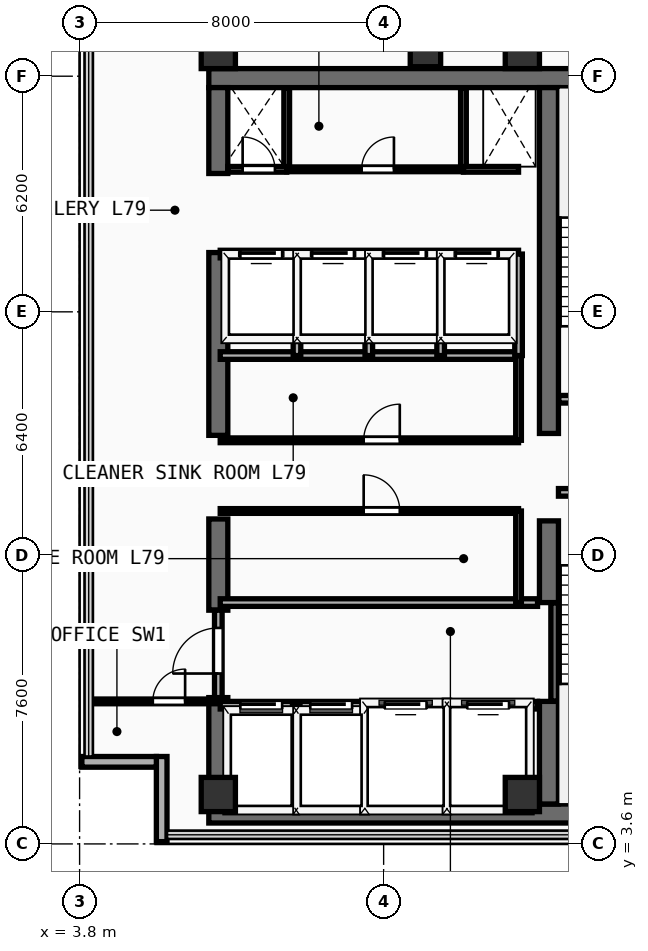
"""IFC4 building model, lengths in metres.
Left out: names, types, materials, properties, quantities, classifications, styles, units other than length and angle.
Written with IfcOpenShell. Run it as: python <this file> out.ifc"""

import sys

from ifc_helpers import new_model, si_unit, direction, frame, frame_2d, origin, origin_2d, place, context, subcontext, project, spatial, rectangle, extrude, element, fill, save


model = new_model("IFC4")
c1 = context("Model", 3, precision=1e-05, world=origin(), true_north=direction((0.0, 1.0)))
c2 = subcontext(c1, "Body", "Model", "MODEL_VIEW")
j1 = project(units=[si_unit("LENGTHUNIT", "METRE"), si_unit("PLANEANGLEUNIT", "RADIAN")], contexts=[c1])
p1 = place(None, origin())
s1 = spatial("IfcSite", under=j1, at=p1, CompositionType="ELEMENT")
p2 = place(p1, origin())
s2 = spatial("IfcBuilding", under=s1, at=p2, CompositionType="ELEMENT")
p3 = place(p2, frame((0.0, 0.0, 308.4)))
s3 = spatial("IfcBuildingStorey", under=s2, at=p3, CompositionType="ELEMENT", Elevation=308.4)
for number, where, z_axis, x_axis in (
    (1, (7.2, 4.4, 0.0), (0.0, 0.0, 1.0), (1.0, 0.0, 0.0)),
    (2, (7.2, 23.75, 0.0), (0.0, 0.0, 1.0), (1.0, 0.0, 0.0)),
):
    element("IfcWall", number, at=place(p3, frame(where, z_axis=z_axis, x_axis=x_axis)), inside=s3, PredefinedType="SHEAR", context=c2, shape_type="SweptSolid", body=[
        extrude(rectangle(XDim=13.85, YDim=0.5, at=frame_2d((6.925, 0.0))), origin(), (0.0, 0.0, 1.0), 3.56),
    ])
p4 = place(p3, frame((7.45, 4.65, 0.0), z_axis=(0.0, 0.0, 1.0), x_axis=(0.0, 1.0, 0.0)))
e3 = element("IfcWall", 3, at=p4, inside=s3, PredefinedType="SHEAR", context=c2, shape_type="SweptSolid", body=[
    extrude(rectangle(XDim=2.8, YDim=0.5, at=frame_2d((1.4, 0.0))), origin(), (0.0, 0.0, 1.0), 3.56),
])
p5 = place(p3, frame((7.45, 9.75, 0.0), z_axis=(0.0, 0.0, 1.0), x_axis=(0.0, 1.0, 0.0)))
e4 = element("IfcWall", 4, at=p5, inside=s3, PredefinedType="SHEAR", context=c2, shape_type="SweptSolid", body=[
    extrude(rectangle(XDim=2.4, YDim=0.5, at=frame_2d((1.2, 0.0))), origin(), (0.0, 0.0, 1.0), 3.56),
])
p6 = place(p3, frame((7.45, 14.35, 0.0), z_axis=(0.0, 0.0, 1.0), x_axis=(0.0, 1.0, 0.0)))
e5 = element("IfcWall", 5, at=p6, inside=s3, PredefinedType="SHEAR", context=c2, shape_type="SweptSolid", body=[
    extrude(rectangle(XDim=4.81, YDim=0.5, at=frame_2d((2.405, 0.0))), origin(), (0.0, 0.0, 1.0), 3.56),
])
p7 = place(p3, frame((7.45, 21.24, 0.0), z_axis=(0.0, 0.0, 1.0), x_axis=(0.0, 1.0, 0.0)))
e6 = element("IfcWall", 6, at=p7, inside=s3, PredefinedType="SHEAR", context=c2, shape_type="SweptSolid", body=[
    extrude(rectangle(XDim=2.26, YDim=0.5, at=frame_2d((1.13, 0.0))), origin(), (0.0, 0.0, 1.0), 3.56),
])
p8 = place(p3, frame((16.15, 4.65, 0.0), z_axis=(0.0, 0.0, 1.0), x_axis=(0.0, 1.0, 0.0)))
e7 = element("IfcWall", 7, at=p8, inside=s3, PredefinedType="SHEAR", context=c2, shape_type="SweptSolid", body=[
    extrude(rectangle(XDim=2.7, YDim=0.5, at=frame_2d((1.35, 0.0))), origin(), (0.0, 0.0, 1.0), 3.56),
])
p9 = place(p3, frame((16.15, 9.95, 0.0), z_axis=(0.0, 0.0, 1.0), x_axis=(0.0, 1.0, 0.0)))
e8 = element("IfcWall", 8, at=p9, inside=s3, PredefinedType="SHEAR", context=c2, shape_type="SweptSolid", body=[
    extrude(rectangle(XDim=2.15, YDim=0.5, at=frame_2d((1.075, 0.0))), origin(), (0.0, 0.0, 1.0), 3.56),
])
p10 = place(p3, frame((16.15, 14.4, 0.0), z_axis=(0.0, 0.0, 1.0), x_axis=(0.0, 1.0, 0.0)))
e9 = element("IfcWall", 9, at=p10, inside=s3, PredefinedType="SHEAR", context=c2, shape_type="SweptSolid", body=[
    extrude(rectangle(XDim=9.1, YDim=0.5, at=frame_2d((4.55, 0.0))), origin(), (0.0, 0.0, 1.0), 3.56),
])
for number, where, z_axis, x_axis in (
    (10, (7.45, 4.9, 0.0), (0.0, 0.0, 1.0), (1.0, 0.0, 0.0)),
    (11, (15.45, 4.9, 0.0), (0.0, 0.0, 1.0), (1.0, 0.0, 0.0)),
    (12, (7.45, 24.45, 0.0), (0.0, 0.0, 1.0), (1.0, 0.0, 0.0)),
    (13, (15.45, 24.45, 0.0), (0.0, 0.0, 1.0), (1.0, 0.0, 0.0)),
):
    element("IfcColumn", number, at=place(p3, frame(where, z_axis=z_axis, x_axis=x_axis)), inside=s3, PredefinedType="COLUMN", context=c2, shape_type="SweptSolid", body=[
        extrude(rectangle(XDim=0.9, YDim=0.9, at=origin_2d()), origin(), (0.0, 0.0, 1.0), 3.56),
    ])
p11 = place(p3, frame((12.9, 24.45, 0.0), z_axis=(0.0, 0.0, 1.0), x_axis=(1.0, 0.0, 0.0)))
e14 = element("IfcColumn", 14, at=p11, inside=s3, PredefinedType="COLUMN", context=c2, shape_type="SweptSolid", body=[
    extrude(rectangle(XDim=0.8, YDim=0.8, at=origin_2d()), origin(), (0.0, 0.0, 1.0), 3.56),
])
p12 = place(p3, frame((5.96, 3.66, 0.0), z_axis=(0.0, 0.0, 1.0), x_axis=(0.0, 1.0, 0.0)))
e15 = element("IfcWall", 15, at=p12, inside=s3, PredefinedType="SOLIDWALL", context=c2, shape_type="SweptSolid", body=[
    extrude(rectangle(XDim=2.24, YDim=0.28, at=frame_2d((1.12, 0.0))), origin(), (0.0, 0.0, 1.0), 3.56),
])
p13 = place(p3, frame((3.86, 5.76, 0.0), z_axis=(0.0, 0.0, 1.0), x_axis=(1.0, 0.0, 0.0)))
e16 = element("IfcWall", 16, at=p13, inside=s3, PredefinedType="SOLIDWALL", context=c2, shape_type="SweptSolid", body=[
    extrude(rectangle(XDim=1.96, YDim=0.28, at=frame_2d((0.98, 0.0))), origin(), (0.0, 0.0, 1.0), 3.56),
])
p14 = place(p3, frame((16.3, 7.36, 0.0), z_axis=(0.0, 0.0, 1.0), x_axis=(0.0, 1.0, 0.0)))
e17 = element("IfcWall", 17, at=p14, inside=s3, PredefinedType="SHEAR", context=c2, shape_type="SweptSolid", body=[
    extrude(rectangle(XDim=2.58, YDim=0.2, at=frame_2d((1.29, 0.0))), origin(), (0.0, 0.0, 1.0), 3.56),
])
p15 = place(p3, frame((16.4, 12.85, 0.0), z_axis=(0.0, 0.0, 1.0), x_axis=(1.0, 0.0, 0.0)))
e18 = element("IfcWall", 18, at=p15, inside=s3, PredefinedType="PARTITIONING", context=c2, shape_type="SweptSolid", body=[
    extrude(rectangle(XDim=3.96, YDim=0.2, at=frame_2d((1.98, 0.0))), origin(), (0.0, 0.0, 1.0), 3.56),
])
p16 = place(p15, frame((1.304, 0.0, 0.0)))
e19 = element("IfcOpeningElement", 19, at=p16, cuts=e18, PredefinedType="OPENING", context=c2, shape_type="SweptSolid", body=[
    extrude(rectangle(XDim=1.1, YDim=2.2, at=frame_2d((0.55, 1.1))), frame((0.0, 0.11, 0.0), z_axis=(0.0, -1.0, 0.0), x_axis=(1.0, 0.0, 0.0)), (0.0, 0.0, 1.0), 0.22),
])
p17 = place(p3, frame((16.41, 15.3, 0.0), z_axis=(0.0, 0.0, 1.0), x_axis=(1.0, 0.0, 0.0)))
e20 = element("IfcWall", 20, at=p17, inside=s3, PredefinedType="PARTITIONING", context=c2, shape_type="SweptSolid", body=[
    extrude(rectangle(XDim=3.95, YDim=0.2, at=frame_2d((1.975, 0.0))), origin(), (0.0, 0.0, 1.0), 3.56),
])
p18 = place(p17, frame((1.294, 0.0, 0.0)))
e21 = element("IfcOpeningElement", 21, at=p18, cuts=e20, PredefinedType="OPENING", context=c2, shape_type="SweptSolid", body=[
    extrude(rectangle(XDim=1.1, YDim=2.2, at=frame_2d((0.55, 1.1))), frame((0.0, 0.11, 0.0), z_axis=(0.0, -1.0, 0.0), x_axis=(1.0, 0.0, 0.0)), (0.0, 0.0, 1.0), 0.22),
])
p19 = place(p3, frame((7.5, 7.25, 0.0), z_axis=(0.0, 0.0, 1.0), x_axis=(1.0, 0.0, 0.0)))
e22 = element("IfcWall", 22, at=p19, inside=s3, PredefinedType="PARTITIONING", context=c2, shape_type="SweptSolid", body=[
    extrude(rectangle(XDim=8.35, YDim=0.2, at=frame_2d((4.175, 0.0))), origin(), (0.0, 0.0, 1.0), 3.56),
])
p20 = place(p19, frame((0.53, 0.0, 0.0)))
e23 = element("IfcOpeningElement", 23, at=p20, cuts=e22, PredefinedType="OPENING", context=c2, shape_type="SweptSolid", body=[
    extrude(rectangle(XDim=1.1, YDim=2.2, at=frame_2d((0.55, 1.1))), frame((0.0, 0.11, 0.0), z_axis=(0.0, -1.0, 0.0), x_axis=(1.0, 0.0, 0.0)), (0.0, 0.0, 1.0), 0.22),
])
p21 = place(p19, frame((2.37, 0.0, 0.0)))
e24 = element("IfcOpeningElement", 24, at=p21, cuts=e22, PredefinedType="OPENING", context=c2, shape_type="SweptSolid", body=[
    extrude(rectangle(XDim=1.1, YDim=2.2, at=frame_2d((0.55, 1.1))), frame((0.0, 0.11, 0.0), z_axis=(0.0, -1.0, 0.0), x_axis=(1.0, 0.0, 0.0)), (0.0, 0.0, 1.0), 0.22),
])
p22 = place(p19, frame((4.33, 0.0, 0.0)))
e25 = element("IfcOpeningElement", 25, at=p22, cuts=e22, PredefinedType="OPENING", context=c2, shape_type="SweptSolid", body=[
    extrude(rectangle(XDim=1.1, YDim=2.2, at=frame_2d((0.55, 1.1))), frame((0.0, 0.11, 0.0), z_axis=(0.0, -1.0, 0.0), x_axis=(1.0, 0.0, 0.0)), (0.0, 0.0, 1.0), 0.22),
])
p23 = place(p19, frame((6.5, 0.0, 0.0)))
e26 = element("IfcOpeningElement", 26, at=p23, cuts=e22, PredefinedType="OPENING", context=c2, shape_type="SweptSolid", body=[
    extrude(rectangle(XDim=1.1, YDim=2.2, at=frame_2d((0.55, 1.1))), frame((0.0, 0.11, 0.0), z_axis=(0.0, -1.0, 0.0), x_axis=(1.0, 0.0, 0.0)), (0.0, 0.0, 1.0), 0.22),
])
p24 = place(p3, frame((7.5, 9.95, 0.0), z_axis=(0.0, 0.0, 1.0), x_axis=(1.0, 0.0, 0.0)))
e27 = element("IfcWall", 27, at=p24, inside=s3, PredefinedType="PARTITIONING", context=c2, shape_type="SweptSolid", body=[
    extrude(rectangle(XDim=8.35, YDim=0.2, at=frame_2d((4.175, 0.0))), origin(), (0.0, 0.0, 1.0), 3.56),
])
for number, where, z_axis, x_axis in (
    (28, (9.5, 4.45, 0.0), (0.0, 0.0, 1.0), (0.0, 1.0, 0.0)),
    (29, (11.36, 4.45, 0.0), (0.0, 0.0, 1.0), (0.0, 1.0, 0.0)),
    (30, (13.46, 4.45, 0.0), (0.0, 0.0, 1.0), (0.0, 1.0, 0.0)),
):
    element("IfcWall", number, at=place(p3, frame(where, z_axis=z_axis, x_axis=x_axis)), inside=s3, PredefinedType="PARTITIONING", context=c2, shape_type="SweptSolid", body=[
        extrude(rectangle(XDim=2.8, YDim=0.2, at=frame_2d((1.4, 0.0))), origin(), (0.0, 0.0, 1.0), 3.56),
    ])
p25 = place(p3, frame((7.45, 7.45, 0.0), z_axis=(0.0, 0.0, 1.0), x_axis=(0.0, 1.0, 0.0)))
e31 = element("IfcWall", 31, at=p25, inside=s3, PredefinedType="PARTITIONING", context=c2, shape_type="SweptSolid", body=[
    extrude(rectangle(XDim=2.3, YDim=0.2, at=frame_2d((1.15, 0.0))), origin(), (0.0, 0.0, 1.0), 2.54),
])
p26 = place(p25, frame((0.633, 0.0, 0.0)))
e32 = element("IfcOpeningElement", 32, at=p26, cuts=e31, PredefinedType="OPENING", context=c2, shape_type="SweptSolid", body=[
    extrude(rectangle(XDim=1.2, YDim=2.25, at=frame_2d((0.6, 1.125))), frame((0.0, 0.11, 0.0), z_axis=(0.0, -1.0, 0.0), x_axis=(1.0, 0.0, 0.0)), (0.0, 0.0, 1.0), 0.22),
])
p27 = place(p3, frame((7.5, 16.45, 0.0), z_axis=(0.0, 0.0, 1.0), x_axis=(1.0, 0.0, 0.0)))
e33 = element("IfcWall", 33, at=p27, inside=s3, PredefinedType="PARTITIONING", context=c2, shape_type="SweptSolid", body=[
    extrude(rectangle(XDim=7.85, YDim=0.2, at=frame_2d((3.925, 0.0))), origin(), (0.0, 0.0, 1.0), 3.56),
])
p28 = place(p3, frame((7.5, 12.36, 0.0), z_axis=(0.0, 0.0, 1.0), x_axis=(1.0, 0.0, 0.0)))
e34 = element("IfcWall", 34, at=p28, inside=s3, PredefinedType="PARTITIONING", context=c2, shape_type="SweptSolid", body=[
    extrude(rectangle(XDim=7.85, YDim=0.125, at=frame_2d((3.925, 0.0))), origin(), (0.0, 0.0, 1.0), 3.56),
])
p29 = place(p28, frame((3.775, 0.0, 0.0)))
e35 = element("IfcOpeningElement", 35, at=p29, cuts=e34, PredefinedType="OPENING", context=c2, shape_type="SweptSolid", body=[
    extrude(rectangle(XDim=0.95, YDim=2.15, at=frame_2d((0.475, 1.075))), frame((0.0, 0.073, 0.0), z_axis=(0.0, -1.0, 0.0), x_axis=(1.0, 0.0, 0.0)), (0.0, 0.0, 1.0), 0.145),
])
p30 = place(p3, frame((7.5, 14.22, 0.0), z_axis=(0.0, 0.0, 1.0), x_axis=(1.0, 0.0, 0.0)))
e36 = element("IfcWall", 36, at=p30, inside=s3, PredefinedType="PARTITIONING", context=c2, shape_type="SweptSolid", body=[
    extrude(rectangle(XDim=7.85, YDim=0.125, at=frame_2d((3.925, 0.0))), origin(), (0.0, 0.0, 1.0), 3.56),
])
p31 = place(p30, frame((3.775, 0.0, 0.0)))
e37 = element("IfcOpeningElement", 37, at=p31, cuts=e36, PredefinedType="OPENING", context=c2, shape_type="SweptSolid", body=[
    extrude(rectangle(XDim=0.95, YDim=2.15, at=frame_2d((0.475, 1.075))), frame((0.0, 0.073, 0.0), z_axis=(0.0, -1.0, 0.0), x_axis=(1.0, 0.0, 0.0)), (0.0, 0.0, 1.0), 0.145),
])
p32 = place(p3, frame((15.35, 9.95, 0.0), z_axis=(0.0, 0.0, 1.0), x_axis=(0.0, 1.0, 0.0)))
e38 = element("IfcWall", 38, at=p32, inside=s3, PredefinedType="PARTITIONING", context=c2, shape_type="SweptSolid", body=[
    extrude(rectangle(XDim=2.41, YDim=0.15, at=frame_2d((1.205, 0.0))), origin(), (0.0, 0.0, 1.0), 3.56),
])
p33 = place(p3, frame((15.35, 14.22, 0.0), z_axis=(0.0, 0.0, 1.0), x_axis=(0.0, 1.0, 0.0)))
e39 = element("IfcWall", 39, at=p33, inside=s3, PredefinedType="PARTITIONING", context=c2, shape_type="SweptSolid", body=[
    extrude(rectangle(XDim=2.23, YDim=0.15, at=frame_2d((1.115, 0.0))), origin(), (0.0, 0.0, 1.0), 3.56),
])
p34 = place(p3, frame((7.5, 19.12, 0.0), z_axis=(0.0, 0.0, 1.0), x_axis=(1.0, 0.0, 0.0)))
e40 = element("IfcWall", 40, at=p34, inside=s3, PredefinedType="PARTITIONING", context=c2, shape_type="SweptSolid", body=[
    extrude(rectangle(XDim=7.85, YDim=0.2, at=frame_2d((3.925, 0.0))), origin(), (0.0, 0.0, 1.0), 3.56),
])
p35 = place(p34, frame((0.53, 0.0, 0.0)))
e41 = element("IfcOpeningElement", 41, at=p35, cuts=e40, PredefinedType="OPENING", context=c2, shape_type="SweptSolid", body=[
    extrude(rectangle(XDim=1.1, YDim=2.2, at=frame_2d((0.55, 1.1))), frame((0.0, 0.11, 0.0), z_axis=(0.0, -1.0, 0.0), x_axis=(1.0, 0.0, 0.0)), (0.0, 0.0, 1.0), 0.22),
])
p36 = place(p34, frame((2.42, 0.0, 0.0)))
e42 = element("IfcOpeningElement", 42, at=p36, cuts=e40, PredefinedType="OPENING", context=c2, shape_type="SweptSolid", body=[
    extrude(rectangle(XDim=1.1, YDim=2.2, at=frame_2d((0.55, 1.1))), frame((0.0, 0.11, 0.0), z_axis=(0.0, -1.0, 0.0), x_axis=(1.0, 0.0, 0.0)), (0.0, 0.0, 1.0), 0.22),
])
p37 = place(p34, frame((4.31, 0.0, 0.0)))
e43 = element("IfcOpeningElement", 43, at=p37, cuts=e40, PredefinedType="OPENING", context=c2, shape_type="SweptSolid", body=[
    extrude(rectangle(XDim=1.1, YDim=2.2, at=frame_2d((0.55, 1.1))), frame((0.0, 0.11, 0.0), z_axis=(0.0, -1.0, 0.0), x_axis=(1.0, 0.0, 0.0)), (0.0, 0.0, 1.0), 0.22),
])
p38 = place(p34, frame((6.2, 0.0, 0.0)))
e44 = element("IfcOpeningElement", 44, at=p38, cuts=e40, PredefinedType="OPENING", context=c2, shape_type="SweptSolid", body=[
    extrude(rectangle(XDim=1.1, YDim=2.2, at=frame_2d((0.55, 1.1))), frame((0.0, 0.11, 0.0), z_axis=(0.0, -1.0, 0.0), x_axis=(1.0, 0.0, 0.0)), (0.0, 0.0, 1.0), 0.22),
])
for number, where, z_axis, x_axis in (
    (45, (15.35, 16.45, 0.0), (0.0, 0.0, 1.0), (0.0, 1.0, 0.0)),
    (46, (9.52, 16.45, 0.0), (0.0, 0.0, 1.0), (0.0, 1.0, 0.0)),
    (47, (11.41, 16.45, 0.0), (0.0, 0.0, 1.0), (0.0, 1.0, 0.0)),
    (48, (13.3, 16.45, 0.0), (0.0, 0.0, 1.0), (0.0, 1.0, 0.0)),
):
    element("IfcWall", number, at=place(p3, frame(where, z_axis=z_axis, x_axis=x_axis)), inside=s3, PredefinedType="PARTITIONING", context=c2, shape_type="SweptSolid", body=[
        extrude(rectangle(XDim=2.67, YDim=0.2, at=frame_2d((1.335, 0.0))), origin(), (0.0, 0.0, 1.0), 3.56),
    ])
for number, where, z_axis, x_axis in (
    (49, (9.25, 21.35, 0.0), (0.0, 0.0, 1.0), (0.0, 1.0, 0.0)),
    (50, (13.9, 21.35, 0.0), (0.0, 0.0, 1.0), (0.0, 1.0, 0.0)),
):
    element("IfcWall", number, at=place(p3, frame(where, z_axis=z_axis, x_axis=x_axis)), inside=s3, PredefinedType="PARTITIONING", context=c2, shape_type="SweptSolid", body=[
        extrude(rectangle(XDim=2.13, YDim=0.15, at=frame_2d((1.065, 0.0))), origin(), (0.0, 0.0, 1.0), 3.56),
    ])
p39 = place(p3, frame((7.7, 21.35, 0.0), z_axis=(0.0, 0.0, 1.0), x_axis=(1.0, 0.0, 0.0)))
e51 = element("IfcWall", 51, at=p39, inside=s3, PredefinedType="PARTITIONING", context=c2, shape_type="SweptSolid", body=[
    extrude(rectangle(XDim=1.55, YDim=0.15, at=frame_2d((0.775, 0.0))), origin(), (0.0, 0.0, 1.0), 3.56),
])
p40 = place(p39, frame((0.39, 0.0, 0.0)))
e52 = element("IfcOpeningElement", 52, at=p40, cuts=e51, PredefinedType="OPENING", context=c2, shape_type="SweptSolid", body=[
    extrude(rectangle(XDim=0.85, YDim=2.15, at=frame_2d((0.425, 1.075))), frame((0.0, 0.085, 0.0), z_axis=(0.0, -1.0, 0.0), x_axis=(1.0, 0.0, 0.0)), (0.0, 0.0, 1.0), 0.17),
])
p41 = place(p3, frame((13.9, 21.35, 0.0), z_axis=(0.0, 0.0, 1.0), x_axis=(1.0, 0.0, 0.0)))
e53 = element("IfcWall", 53, at=p41, inside=s3, PredefinedType="PARTITIONING", context=c2, shape_type="SweptSolid", body=[
    extrude(rectangle(XDim=1.45, YDim=0.15, at=frame_2d((0.725, 0.0))), origin(), (0.0, 0.0, 1.0), 3.56),
])
p42 = place(p3, frame((9.25, 21.35, 0.0), z_axis=(0.0, 0.0, 1.0), x_axis=(1.0, 0.0, 0.0)))
e54 = element("IfcWall", 54, at=p42, inside=s3, PredefinedType="PARTITIONING", context=c2, shape_type="SweptSolid", body=[
    extrude(rectangle(XDim=4.65, YDim=0.125, at=frame_2d((2.325, 0.0))), origin(), (0.0, 0.0, 1.0), 3.56),
])
p43 = place(p42, frame((1.971, 0.0, 0.0)))
e55 = element("IfcOpeningElement", 55, at=p43, cuts=e54, PredefinedType="OPENING", context=c2, shape_type="SweptSolid", body=[
    extrude(rectangle(XDim=0.85, YDim=2.15, at=frame_2d((0.425, 1.075))), frame((0.0, 0.073, 0.0), z_axis=(0.0, -1.0, 0.0), x_axis=(1.0, 0.0, 0.0)), (0.0, 0.0, 1.0), 0.145),
])
p44 = place(p3, frame((4.04, 7.35, 0.0), z_axis=(0.0, 0.0, 1.0), x_axis=(1.0, 0.0, 0.0)))
e56 = element("IfcWall", 56, at=p44, inside=s3, PredefinedType="PARTITIONING", context=c2, shape_type="SweptSolid", body=[
    extrude(rectangle(XDim=3.36, YDim=0.125, at=frame_2d((1.68, 0.0))), origin(), (0.0, 0.0, 1.0), 3.56),
])
p45 = place(p44, frame((1.687, 0.0, 0.0)))
e57 = element("IfcOpeningElement", 57, at=p45, cuts=e56, PredefinedType="OPENING", context=c2, shape_type="SweptSolid", body=[
    extrude(rectangle(XDim=0.85, YDim=2.15, at=frame_2d((0.425, 1.075))), frame((0.0, 0.073, 0.0), z_axis=(0.0, -1.0, 0.0), x_axis=(1.0, 0.0, 0.0)), (0.0, 0.0, 1.0), 0.145),
])
p46 = place(p20, origin())
e58 = element("IfcDoor", 58, at=p46, inside=s3, OperationType="SLIDING_TO_LEFT", PredefinedType="DOOR", context=c2, shape_type="SweptSolid", body=[
    extrude(rectangle(XDim=1.1, YDim=2.2, at=frame_2d((0.55, 1.1))), frame((0.0, 0.025, 0.0), z_axis=(0.0, -1.0, 0.0), x_axis=(1.0, 0.0, 0.0)), (0.0, 0.0, 1.0), 0.05),
])
fill(e23, e58)
p47 = place(p21, origin())
e59 = element("IfcDoor", 59, at=p47, inside=s3, OperationType="SLIDING_TO_LEFT", PredefinedType="DOOR", context=c2, shape_type="SweptSolid", body=[
    extrude(rectangle(XDim=1.1, YDim=2.2, at=frame_2d((0.55, 1.1))), frame((0.0, 0.025, 0.0), z_axis=(0.0, -1.0, 0.0), x_axis=(1.0, 0.0, 0.0)), (0.0, 0.0, 1.0), 0.05),
])
fill(e24, e59)
p48 = place(p22, origin())
e60 = element("IfcDoor", 60, at=p48, inside=s3, OperationType="SLIDING_TO_LEFT", PredefinedType="DOOR", context=c2, shape_type="SweptSolid", body=[
    extrude(rectangle(XDim=1.1, YDim=2.2, at=frame_2d((0.55, 1.1))), frame((0.0, 0.025, 0.0), z_axis=(0.0, -1.0, 0.0), x_axis=(1.0, 0.0, 0.0)), (0.0, 0.0, 1.0), 0.05),
])
fill(e25, e60)
p49 = place(p23, origin())
e61 = element("IfcDoor", 61, at=p49, inside=s3, OperationType="SLIDING_TO_LEFT", PredefinedType="DOOR", context=c2, shape_type="SweptSolid", body=[
    extrude(rectangle(XDim=1.1, YDim=2.2, at=frame_2d((0.55, 1.1))), frame((0.0, 0.025, 0.0), z_axis=(0.0, -1.0, 0.0), x_axis=(1.0, 0.0, 0.0)), (0.0, 0.0, 1.0), 0.05),
])
fill(e26, e61)
p50 = place(p26, frame((1.2, 0.0, 0.0), z_axis=(0.0, 0.0, 1.0), x_axis=(-1.0, 0.0, 0.0)))
e62 = element("IfcDoor", 62, at=p50, inside=s3, OperationType="SINGLE_SWING_RIGHT", PredefinedType="DOOR", context=c2, shape_type="SweptSolid", body=[
    extrude(rectangle(XDim=1.2, YDim=2.25, at=frame_2d((0.6, 1.125))), frame((0.0, 0.025, 0.0), z_axis=(0.0, -1.0, 0.0), x_axis=(1.0, 0.0, 0.0)), (0.0, 0.0, 1.0), 0.05),
])
fill(e32, e62)
p51 = place(p29, origin())
e63 = element("IfcDoor", 63, at=p51, inside=s3, OperationType="SINGLE_SWING_LEFT", PredefinedType="DOOR", context=c2, shape_type="SweptSolid", body=[
    extrude(rectangle(XDim=0.95, YDim=2.15, at=frame_2d((0.475, 1.075))), frame((0.0, 0.025, 0.0), z_axis=(0.0, -1.0, 0.0), x_axis=(1.0, 0.0, 0.0)), (0.0, 0.0, 1.0), 0.05),
])
fill(e35, e63)
p52 = place(p31, origin())
e64 = element("IfcDoor", 64, at=p52, inside=s3, OperationType="SINGLE_SWING_RIGHT", PredefinedType="DOOR", context=c2, shape_type="SweptSolid", body=[
    extrude(rectangle(XDim=0.95, YDim=2.15, at=frame_2d((0.475, 1.075))), frame((0.0, 0.025, 0.0), z_axis=(0.0, -1.0, 0.0), x_axis=(1.0, 0.0, 0.0)), (0.0, 0.0, 1.0), 0.05),
])
fill(e37, e64)
p53 = place(p35, origin())
e65 = element("IfcDoor", 65, at=p53, inside=s3, OperationType="SLIDING_TO_LEFT", PredefinedType="DOOR", context=c2, shape_type="SweptSolid", body=[
    extrude(rectangle(XDim=1.1, YDim=2.2, at=frame_2d((0.55, 1.1))), frame((0.0, 0.025, 0.0), z_axis=(0.0, -1.0, 0.0), x_axis=(1.0, 0.0, 0.0)), (0.0, 0.0, 1.0), 0.05),
])
fill(e41, e65)
p54 = place(p36, origin())
e66 = element("IfcDoor", 66, at=p54, inside=s3, OperationType="SLIDING_TO_LEFT", PredefinedType="DOOR", context=c2, shape_type="SweptSolid", body=[
    extrude(rectangle(XDim=1.1, YDim=2.2, at=frame_2d((0.55, 1.1))), frame((0.0, 0.025, 0.0), z_axis=(0.0, -1.0, 0.0), x_axis=(1.0, 0.0, 0.0)), (0.0, 0.0, 1.0), 0.05),
])
fill(e42, e66)
p55 = place(p37, origin())
e67 = element("IfcDoor", 67, at=p55, inside=s3, OperationType="SLIDING_TO_LEFT", PredefinedType="DOOR", context=c2, shape_type="SweptSolid", body=[
    extrude(rectangle(XDim=1.1, YDim=2.2, at=frame_2d((0.55, 1.1))), frame((0.0, 0.025, 0.0), z_axis=(0.0, -1.0, 0.0), x_axis=(1.0, 0.0, 0.0)), (0.0, 0.0, 1.0), 0.05),
])
fill(e43, e67)
p56 = place(p38, origin())
e68 = element("IfcDoor", 68, at=p56, inside=s3, OperationType="SLIDING_TO_LEFT", PredefinedType="DOOR", context=c2, shape_type="SweptSolid", body=[
    extrude(rectangle(XDim=1.1, YDim=2.2, at=frame_2d((0.55, 1.1))), frame((0.0, 0.025, 0.0), z_axis=(0.0, -1.0, 0.0), x_axis=(1.0, 0.0, 0.0)), (0.0, 0.0, 1.0), 0.05),
])
fill(e44, e68)
p57 = place(p40, origin())
e69 = element("IfcDoor", 69, at=p57, inside=s3, OperationType="SINGLE_SWING_LEFT", PredefinedType="DOOR", context=c2, shape_type="SweptSolid", body=[
    extrude(rectangle(XDim=0.85, YDim=2.15, at=frame_2d((0.425, 1.075))), frame((0.0, 0.025, 0.0), z_axis=(0.0, -1.0, 0.0), x_axis=(1.0, 0.0, 0.0)), (0.0, 0.0, 1.0), 0.05),
])
fill(e52, e69)
p58 = place(p43, origin())
e70 = element("IfcDoor", 70, at=p58, inside=s3, OperationType="SINGLE_SWING_RIGHT", PredefinedType="DOOR", context=c2, shape_type="SweptSolid", body=[
    extrude(rectangle(XDim=0.85, YDim=2.15, at=frame_2d((0.425, 1.075))), frame((0.0, 0.025, 0.0), z_axis=(0.0, -1.0, 0.0), x_axis=(1.0, 0.0, 0.0)), (0.0, 0.0, 1.0), 0.05),
])
fill(e55, e70)
p59 = place(p45, origin())
e71 = element("IfcDoor", 71, at=p59, inside=s3, OperationType="SINGLE_SWING_RIGHT", PredefinedType="DOOR", context=c2, shape_type="SweptSolid", body=[
    extrude(rectangle(XDim=0.85, YDim=2.15, at=frame_2d((0.425, 1.075))), frame((0.0, 0.025, 0.0), z_axis=(0.0, -1.0, 0.0), x_axis=(1.0, 0.0, 0.0)), (0.0, 0.0, 1.0), 0.05),
])
fill(e57, e71)
save(model, sys.argv[1])
